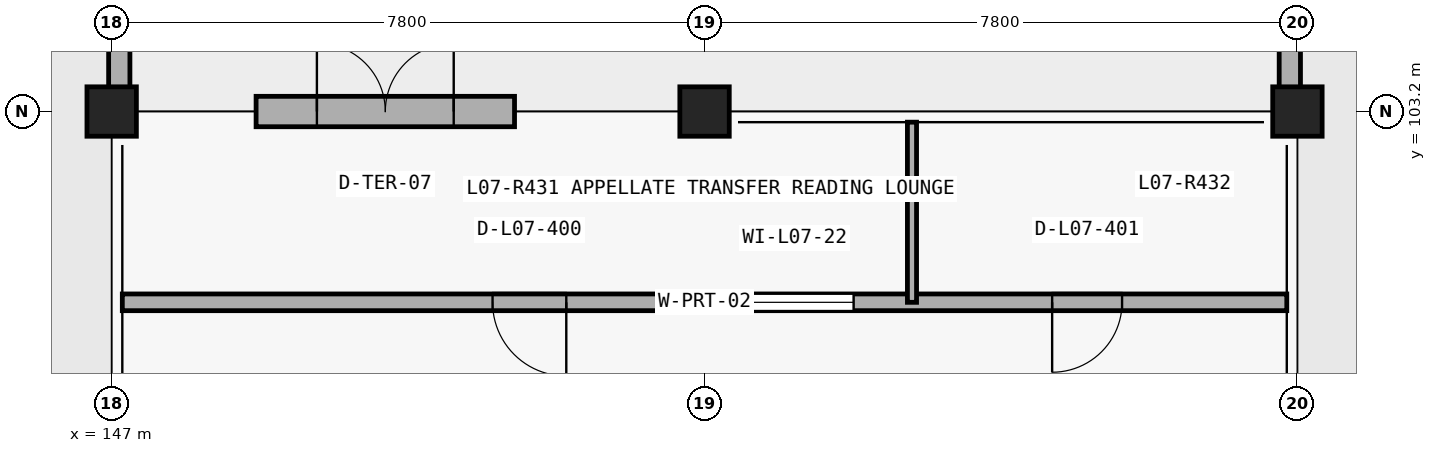
"""IFC4 building model, lengths in metres.
Left out: names, types, materials, properties, quantities, classifications, styles, units other than length and angle.
Written with IfcOpenShell. Run it as: python <this file> out.ifc"""

import sys

from ifc_helpers import new_model, si_unit, direction, frame, frame_2d, origin_with_axes, origin_2d_with_axis, place, context, subcontext, project, spatial, rectangle, circle, extrude, element, fill, save


model = new_model("IFC4")
c1 = context("Model", 3, precision=1e-05, world=origin_with_axes(), true_north=direction((0.0, 1.0)))
c2 = subcontext(c1, "Body", "Model", "MODEL_VIEW")
j1 = project(units=[si_unit("LENGTHUNIT", "METRE"), si_unit("PLANEANGLEUNIT", "RADIAN")], contexts=[c1])
p1 = place(None, origin_with_axes())
s1 = spatial("IfcSite", under=j1, at=p1, CompositionType="ELEMENT")
p2 = place(p1, origin_with_axes())
s2 = spatial("IfcBuilding", under=s1, at=p2, CompositionType="ELEMENT")
p3 = place(p2, frame((0.0, 0.0, 34.5), z_axis=(0.0, 0.0, 1.0), x_axis=(1.0, 0.0, 0.0)))
s3 = spatial("IfcBuildingStorey", under=s2, at=p3, CompositionType="ELEMENT", Elevation=34.5)
for number, where, z_axis, x_axis in (
    (1, (147.1, 103.304, 34.5), (0.0, 0.0, 1.0), (0.0, 1.0, 0.0)),
    (2, (162.5, 110.9, 34.5), (0.0, 0.0, 1.0), (0.0, -1.0, 0.0)),
):
    element("IfcWall", number, at=place(None, frame(where, z_axis=z_axis, x_axis=x_axis)), inside=s3, PredefinedType="PARAPET", context=c2, shape_type="SweptSolid", body=[
        extrude(rectangle(XDim=7.596, YDim=0.28, at=frame_2d((3.798, 0.0), x_axis=(1.0, 0.0))), origin_with_axes(), (0.0, 0.0, 1.0), 1.12),
    ])
p4 = place(None, frame((148.9, 103.2, 34.5), z_axis=(0.0, 0.0, 1.0), x_axis=(1.0, 0.0, 0.0)))
e3 = element("IfcWall", 3, at=p4, inside=s3, PredefinedType="SOLIDWALL", context=c2, shape_type="SweptSolid", body=[
    extrude(rectangle(XDim=3.4, YDim=0.4, at=frame_2d((1.7, 0.0), x_axis=(1.0, 0.0))), origin_with_axes(), (0.0, 0.0, 1.0), 3.824),
])
p5 = place(None, frame((150.6, 103.2, 34.5), z_axis=(0.0, 0.0, 1.0), x_axis=(1.0, 0.0, 0.0)))
e4 = element("IfcOpeningElement", 4, at=p5, cuts=e3, PredefinedType="OPENING", context=c2, shape_type="SweptSolid", body=[
    extrude(rectangle(XDim=1.8, YDim=2.3, at=frame_2d((0.0, 1.15), x_axis=(1.0, 0.0))), frame((0.0, 0.21, 0.0), z_axis=(0.0, -1.0, 0.0), x_axis=(1.0, 0.0, 0.0)), (0.0, 0.0, 1.0), 0.42),
])
p6 = place(None, frame((147.14, 100.69, 34.5), z_axis=(0.0, 0.0, 1.0), x_axis=(1.0, 0.0, 0.0)))
e5 = element("IfcWall", 5, at=p6, inside=s3, PredefinedType="PARTITIONING", context=c2, shape_type="SweptSolid", body=[
    extrude(rectangle(XDim=15.32, YDim=0.22, at=frame_2d((7.66, 0.0), x_axis=(1.0, 0.0))), origin_with_axes(), (0.0, 0.0, 1.0), 4.14),
])
p7 = place(None, frame((152.496, 100.69, 34.5), z_axis=(0.0, 0.0, 1.0), x_axis=(1.0, 0.0, 0.0)))
e6 = element("IfcOpeningElement", 6, at=p7, cuts=e5, PredefinedType="OPENING", context=c2, shape_type="SweptSolid", body=[
    extrude(rectangle(XDim=0.97, YDim=2.26, at=frame_2d((0.0, 1.13), x_axis=(1.0, 0.0))), frame((0.0, 0.12, 0.0), z_axis=(0.0, -1.0, 0.0), x_axis=(1.0, 0.0, 0.0)), (0.0, 0.0, 1.0), 0.24),
])
p8 = place(None, frame((159.833, 100.69, 34.5), z_axis=(0.0, 0.0, 1.0), x_axis=(1.0, 0.0, 0.0)))
e7 = element("IfcOpeningElement", 7, at=p8, cuts=e5, PredefinedType="OPENING", context=c2, shape_type="SweptSolid", body=[
    extrude(rectangle(XDim=0.92, YDim=2.14, at=frame_2d((0.0, 1.07), x_axis=(1.0, 0.0))), frame((0.0, 0.12, 0.0), z_axis=(0.0, -1.0, 0.0), x_axis=(1.0, 0.0, 0.0)), (0.0, 0.0, 1.0), 0.24),
])
p9 = place(None, frame((155.986, 100.69, 35.55), z_axis=(0.0, 0.0, 1.0), x_axis=(1.0, 0.0, 0.0)))
e8 = element("IfcOpeningElement", 8, at=p9, cuts=e5, PredefinedType="OPENING", context=c2, shape_type="SweptSolid", body=[
    extrude(rectangle(XDim=1.55, YDim=1.35, at=frame_2d((0.0, 0.675), x_axis=(1.0, 0.0))), frame((0.0, 0.12, 0.0), z_axis=(0.0, -1.0, 0.0), x_axis=(1.0, 0.0, 0.0)), (0.0, 0.0, 1.0), 0.24),
])
p10 = place(None, frame((157.529, 100.69, 34.5), z_axis=(0.0, 0.0, 1.0), x_axis=(0.0, 1.0, 0.0)))
e9 = element("IfcWall", 9, at=p10, inside=s3, PredefinedType="PARTITIONING", context=c2, shape_type="SweptSolid", body=[
    extrude(rectangle(XDim=2.37, YDim=0.12, at=frame_2d((1.185, 0.0), x_axis=(1.0, 0.0))), origin_with_axes(), (0.0, 0.0, 1.0), 4.14),
])
for number, where, z_axis, x_axis in (
    (10, (147.0, 103.2, 34.5), (0.0, 0.0, 1.0), (1.0, 0.0, 0.0)),
    (11, (154.8, 103.2, 34.5), (0.0, 0.0, 1.0), (1.0, 0.0, 0.0)),
    (12, (162.6, 103.2, 34.5), (0.0, 0.0, 1.0), (1.0, 0.0, 0.0)),
):
    element("IfcColumn", number, at=place(None, frame(where, z_axis=z_axis, x_axis=x_axis)), inside=s3, PredefinedType="COLUMN", context=c2, shape_type="SweptSolid", body=[
        extrude(circle(Radius=0.325, at=origin_2d_with_axis()), origin_with_axes(), (0.0, 0.0, 1.0), 4.5),
    ])
p11 = place(None, frame((150.6, 103.2, 34.5), z_axis=(0.0, 0.0, 1.0), x_axis=(1.0, 0.0, 0.0)))
e13 = element("IfcDoor", 13, at=p11, inside=s3, OperationType="DOUBLE_DOOR_SINGLE_SWING", PredefinedType="DOOR", context=c2, shape_type="SweptSolid", body=[
    extrude(rectangle(XDim=1.8, YDim=2.3, at=frame_2d((0.0, 1.15), x_axis=(1.0, 0.0))), frame((0.0, 0.04, 0.0), z_axis=(0.0, -1.0, 0.0), x_axis=(1.0, 0.0, 0.0)), (0.0, 0.0, 1.0), 0.08),
])
fill(e4, e13)
p12 = place(None, frame((152.496, 100.69, 34.5), z_axis=(0.0, 0.0, 1.0), x_axis=(-1.0, 0.0, 0.0)))
e14 = element("IfcDoor", 14, at=p12, inside=s3, OperationType="SINGLE_SWING_RIGHT", PredefinedType="DOOR", context=c2, shape_type="SweptSolid", body=[
    extrude(rectangle(XDim=0.97, YDim=2.26, at=frame_2d((0.0, 1.13), x_axis=(1.0, 0.0))), frame((0.0, 0.04, 0.0), z_axis=(0.0, -1.0, 0.0), x_axis=(1.0, 0.0, 0.0)), (0.0, 0.0, 1.0), 0.08),
])
fill(e6, e14)
p13 = place(None, frame((159.833, 100.69, 34.5), z_axis=(0.0, 0.0, 1.0), x_axis=(-1.0, 0.0, 0.0)))
e15 = element("IfcDoor", 15, at=p13, inside=s3, OperationType="SINGLE_SWING_LEFT", PredefinedType="DOOR", context=c2, shape_type="SweptSolid", body=[
    extrude(rectangle(XDim=0.92, YDim=2.14, at=frame_2d((0.0, 1.07), x_axis=(1.0, 0.0))), frame((0.0, 0.04, 0.0), z_axis=(0.0, -1.0, 0.0), x_axis=(1.0, 0.0, 0.0)), (0.0, 0.0, 1.0), 0.08),
])
fill(e7, e15)
p14 = place(None, frame((155.986, 100.69, 35.55), z_axis=(0.0, 0.0, 1.0), x_axis=(1.0, 0.0, 0.0)))
e16 = element("IfcWindow", 16, at=p14, inside=s3, PartitioningType="SINGLE_PANEL", PredefinedType="WINDOW", context=c2, shape_type="SweptSolid", body=[
    extrude(rectangle(XDim=1.55, YDim=1.35, at=frame_2d((0.0, 0.675), x_axis=(1.0, 0.0))), frame((0.0, 0.03, 0.0), z_axis=(0.0, -1.0, 0.0), x_axis=(1.0, 0.0, 0.0)), (0.0, 0.0, 1.0), 0.06),
])
fill(e8, e16)
save(model, sys.argv[1])
